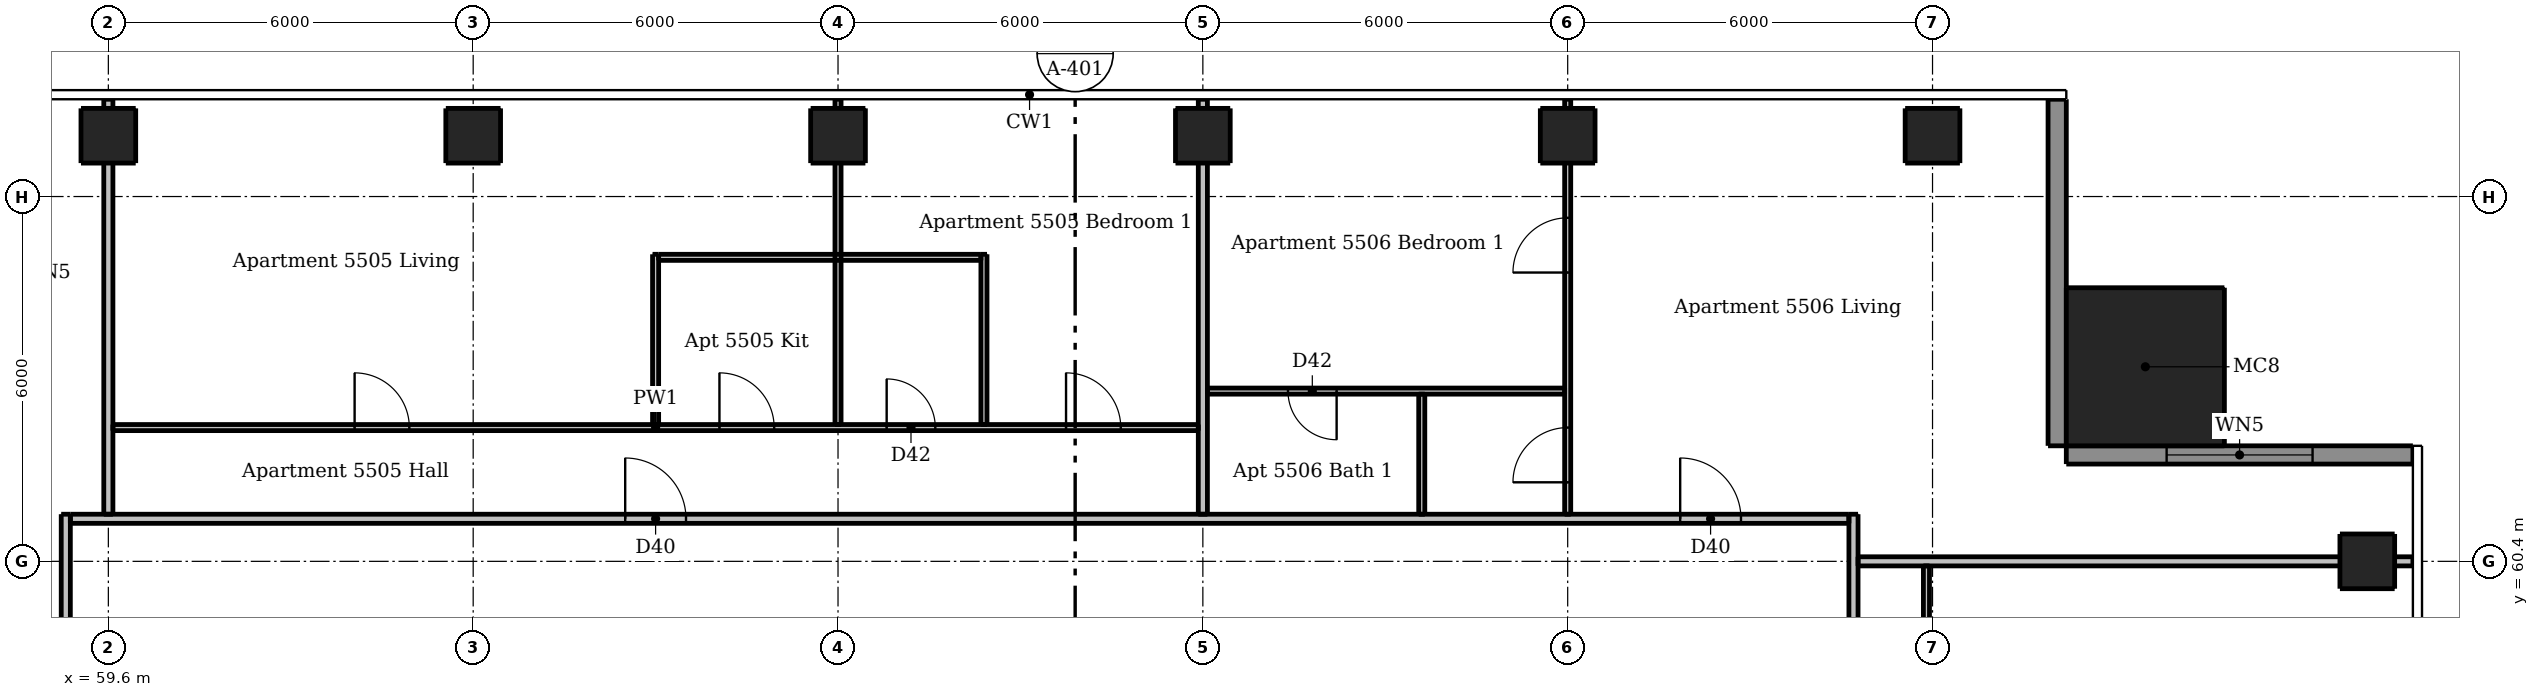
"""IFC4 building model, lengths in metres.
Left out: names, types, materials, properties, quantities, classifications, styles, units other than length and angle.
Written with IfcOpenShell. Run it as: python <this file> out.ifc"""

import sys

from ifc_helpers import new_model, si_unit, direction, frame, frame_2d, origin, origin_2d, place, context, subcontext, project, spatial, rectangle, extrude, element, fill, save


model = new_model("IFC4")
c1 = context("Model", 3, precision=1e-05, world=origin(), true_north=direction((0.0, 1.0)))
c2 = subcontext(c1, "Body", "Model", "MODEL_VIEW")
j1 = project(units=[si_unit("LENGTHUNIT", "METRE"), si_unit("PLANEANGLEUNIT", "RADIAN")], contexts=[c1])
p1 = place(None, origin())
s1 = spatial("IfcSite", under=j1, at=p1, CompositionType="ELEMENT")
p2 = place(p1, origin())
s2 = spatial("IfcBuilding", under=s1, at=p2, CompositionType="ELEMENT")
p3 = place(p2, frame((0.0, 0.0, 206.8)))
s3 = spatial("IfcBuildingStorey", under=s2, at=p3, CompositionType="ELEMENT", Elevation=206.8)
for number, where, z_axis, x_axis in (
    (1, (96.75, 60.4, 0.0), (0.0, 0.0, 1.0), (1.0, 0.0, 0.0)),
    (2, (59.6, 67.4, 0.0), (0.0, 0.0, 1.0), (1.0, 0.0, 0.0)),
    (3, (65.6, 67.4, 0.0), (0.0, 0.0, 1.0), (1.0, 0.0, 0.0)),
    (4, (71.6, 67.4, 0.0), (0.0, 0.0, 1.0), (1.0, 0.0, 0.0)),
    (5, (77.6, 67.4, 0.0), (0.0, 0.0, 1.0), (1.0, 0.0, 0.0)),
    (6, (83.6, 67.4, 0.0), (0.0, 0.0, 1.0), (1.0, 0.0, 0.0)),
    (7, (89.6, 67.4, 0.0), (0.0, 0.0, 1.0), (1.0, 0.0, 0.0)),
):
    element("IfcColumn", number, at=place(p3, frame(where, z_axis=z_axis, x_axis=x_axis)), inside=s3, PredefinedType="COLUMN", context=c2, shape_type="SweptSolid", body=[
        extrude(rectangle(XDim=0.9, YDim=0.9, at=origin_2d()), origin(), (0.0, 0.0, 1.0), 3.05),
    ])
p4 = place(p3, frame((93.1, 63.6, 0.0), z_axis=(0.0, 0.0, 1.0), x_axis=(1.0, 0.0, 0.0)))
e8 = element("IfcColumn", 8, at=p4, inside=s3, PredefinedType="COLUMN", context=c2, shape_type="SweptSolid", body=[
    extrude(rectangle(XDim=2.6, YDim=2.6, at=origin_2d()), origin(), (0.0, 0.0, 1.0), 3.3),
])
p5 = place(p3, frame((97.5, 62.15, 0.0), z_axis=(0.0, 0.0, 1.0), x_axis=(-1.0, 0.0, 0.0)))
e9 = element("IfcWall", 9, at=p5, inside=s3, PredefinedType="SOLIDWALL", context=c2, shape_type="SweptSolid", body=[
    extrude(rectangle(XDim=5.7, YDim=0.3, at=frame_2d((2.85, 0.0))), origin(), (0.0, 0.0, 1.0), 3.05),
])
p6 = place(p5, frame((1.65, 0.0, 0.15)))
e10 = element("IfcOpeningElement", 10, at=p6, cuts=e9, PredefinedType="OPENING", context=c2, shape_type="SweptSolid", body=[
    extrude(rectangle(XDim=2.4, YDim=2.1, at=frame_2d((1.2, 1.05))), frame((0.0, 0.16, 0.0), z_axis=(0.0, -1.0, 0.0), x_axis=(1.0, 0.0, 0.0)), (0.0, 0.0, 1.0), 0.32),
])
p7 = place(p3, frame((91.65, 62.3, 0.0), z_axis=(0.0, 0.0, 1.0), x_axis=(0.0, 1.0, 0.0)))
e11 = element("IfcWall", 11, at=p7, inside=s3, PredefinedType="SOLIDWALL", context=c2, shape_type="SweptSolid", body=[
    extrude(rectangle(XDim=5.7, YDim=0.3, at=frame_2d((2.85, 0.0))), origin(), (0.0, 0.0, 1.0), 3.05),
])
p8 = place(p3, frame((68.6, 62.65, 0.0), z_axis=(0.0, 0.0, 1.0), x_axis=(0.0, 1.0, 0.0)))
e12 = element("IfcWall", 12, at=p8, inside=s3, PredefinedType="PARTITIONING", context=c2, shape_type="SweptSolid", body=[
    extrude(rectangle(XDim=2.8, YDim=0.1, at=frame_2d((1.4, 0.0))), origin(), (0.0, 0.0, 1.0), 3.05),
])
p9 = place(p3, frame((71.6, 62.65, 0.0), z_axis=(0.0, 0.0, 1.0), x_axis=(0.0, 1.0, 0.0)))
e13 = element("IfcWall", 13, at=p9, inside=s3, PredefinedType="PARTITIONING", context=c2, shape_type="SweptSolid", body=[
    extrude(rectangle(XDim=5.35, YDim=0.1, at=frame_2d((2.675, 0.0))), origin(), (0.0, 0.0, 1.0), 2.516),
])
p10 = place(p3, frame((74.0, 62.65, 0.0), z_axis=(0.0, 0.0, 1.0), x_axis=(0.0, 1.0, 0.0)))
e14 = element("IfcWall", 14, at=p10, inside=s3, PredefinedType="PARTITIONING", context=c2, shape_type="SweptSolid", body=[
    extrude(rectangle(XDim=2.8, YDim=0.1, at=frame_2d((1.4, 0.0))), origin(), (0.0, 0.0, 1.0), 3.05),
])
p11 = place(p3, frame((81.2, 61.175, 0.0), z_axis=(0.0, 0.0, 1.0), x_axis=(0.0, 1.0, 0.0)))
e15 = element("IfcWall", 15, at=p11, inside=s3, PredefinedType="PARTITIONING", context=c2, shape_type="SweptSolid", body=[
    extrude(rectangle(XDim=1.975, YDim=0.1, at=frame_2d((0.987, 0.0))), origin(), (0.0, 0.0, 1.0), 3.05),
])
p12 = place(p3, frame((83.6, 61.175, 0.0), z_axis=(0.0, 0.0, 1.0), x_axis=(0.0, 1.0, 0.0)))
e16 = element("IfcWall", 16, at=p12, inside=s3, PredefinedType="PARTITIONING", context=c2, shape_type="SweptSolid", body=[
    extrude(rectangle(XDim=6.825, YDim=0.1, at=frame_2d((3.413, 0.0))), origin(), (0.0, 0.0, 1.0), 2.516),
])
p13 = place(p12, frame((0.525, 0.0, 0.0)))
e17 = element("IfcOpeningElement", 17, at=p13, cuts=e16, PredefinedType="OPENING", context=c2, shape_type="SweptSolid", body=[
    extrude(rectangle(XDim=0.9, YDim=2.1, at=frame_2d((0.45, 1.05))), frame((0.0, 0.06, 0.0), z_axis=(0.0, -1.0, 0.0), x_axis=(1.0, 0.0, 0.0)), (0.0, 0.0, 1.0), 0.12),
])
p14 = place(p12, frame((3.975, 0.0, 0.0)))
e18 = element("IfcOpeningElement", 18, at=p14, cuts=e16, PredefinedType="OPENING", context=c2, shape_type="SweptSolid", body=[
    extrude(rectangle(XDim=0.9, YDim=2.1, at=frame_2d((0.45, 1.05))), frame((0.0, 0.06, 0.0), z_axis=(0.0, -1.0, 0.0), x_axis=(1.0, 0.0, 0.0)), (0.0, 0.0, 1.0), 0.12),
])
p15 = place(p3, frame((89.5, 60.325, 0.0), z_axis=(0.0, 0.0, 1.0), x_axis=(0.0, -1.0, 0.0)))
e19 = element("IfcWall", 19, at=p15, inside=s3, PredefinedType="PARTITIONING", context=c2, shape_type="SweptSolid", body=[
    extrude(rectangle(XDim=20.85, YDim=0.1, at=frame_2d((10.425, 0.0))), origin(), (0.0, 0.0, 1.0), 2.51),
])
p16 = place(p15, frame((12.975, 0.0, 0.0)))
e20 = element("IfcOpeningElement", 20, at=p16, cuts=e19, PredefinedType="OPENING", context=c2, shape_type="SweptSolid", body=[
    extrude(rectangle(XDim=0.9, YDim=2.1, at=frame_2d((0.45, 1.05))), frame((0.0, 0.06, 0.0), z_axis=(0.0, -1.0, 0.0), x_axis=(1.0, 0.0, 0.0)), (0.0, 0.0, 1.0), 0.12),
])
p17 = place(p15, frame((6.975, 0.0, 0.0)))
e21 = element("IfcOpeningElement", 21, at=p17, cuts=e19, PredefinedType="OPENING", context=c2, shape_type="SweptSolid", body=[
    extrude(rectangle(XDim=0.9, YDim=2.1, at=frame_2d((0.45, 1.05))), frame((0.0, 0.06, 0.0), z_axis=(0.0, -1.0, 0.0), x_axis=(1.0, 0.0, 0.0)), (0.0, 0.0, 1.0), 0.12),
])
p18 = place(p15, frame((18.975, 0.0, 0.0)))
e22 = element("IfcOpeningElement", 22, at=p18, cuts=e19, PredefinedType="OPENING", context=c2, shape_type="SweptSolid", body=[
    extrude(rectangle(XDim=0.9, YDim=2.1, at=frame_2d((0.45, 1.05))), frame((0.0, 0.06, 0.0), z_axis=(0.0, -1.0, 0.0), x_axis=(1.0, 0.0, 0.0)), (0.0, 0.0, 1.0), 0.12),
])
p19 = place(p15, frame((1.275, 0.0, 0.0)))
e23 = element("IfcOpeningElement", 23, at=p19, cuts=e19, PredefinedType="OPENING", context=c2, shape_type="SweptSolid", body=[
    extrude(rectangle(XDim=0.9, YDim=2.1, at=frame_2d((0.45, 1.05))), frame((0.0, 0.06, 0.0), z_axis=(0.0, -1.0, 0.0), x_axis=(1.0, 0.0, 0.0)), (0.0, 0.0, 1.0), 0.12),
])
p20 = place(p15, frame((4.325, 0.0, 0.0)))
e24 = element("IfcOpeningElement", 24, at=p20, cuts=e19, PredefinedType="OPENING", context=c2, shape_type="SweptSolid", body=[
    extrude(rectangle(XDim=0.8, YDim=2.1, at=frame_2d((0.4, 1.05))), frame((0.0, 0.06, 0.0), z_axis=(0.0, -1.0, 0.0), x_axis=(1.0, 0.0, 0.0)), (0.0, 0.0, 1.0), 0.12),
])
p21 = place(p3, frame((68.65, 65.4, 0.0), z_axis=(0.0, 0.0, 1.0), x_axis=(1.0, 0.0, 0.0)))
e25 = element("IfcWall", 25, at=p21, inside=s3, PredefinedType="PARTITIONING", context=c2, shape_type="SweptSolid", body=[
    extrude(rectangle(XDim=5.3, YDim=0.1, at=frame_2d((2.65, 0.0))), origin(), (0.0, 0.0, 1.0), 3.05),
])
p22 = place(p3, frame((83.55, 63.2, 0.0), z_axis=(0.0, 0.0, 1.0), x_axis=(-1.0, 0.0, 0.0)))
e26 = element("IfcWall", 26, at=p22, inside=s3, PredefinedType="PARTITIONING", context=c2, shape_type="SweptSolid", body=[
    extrude(rectangle(XDim=5.875, YDim=0.1, at=frame_2d((2.938, 0.0))), origin(), (0.0, 0.0, 1.0), 3.05),
])
p23 = place(p22, frame((3.75, 0.0, 0.0)))
e27 = element("IfcOpeningElement", 27, at=p23, cuts=e26, PredefinedType="OPENING", context=c2, shape_type="SweptSolid", body=[
    extrude(rectangle(XDim=0.8, YDim=2.1, at=frame_2d((0.4, 1.05))), frame((0.0, 0.06, 0.0), z_axis=(0.0, -1.0, 0.0), x_axis=(1.0, 0.0, 0.0)), (0.0, 0.0, 1.0), 0.12),
])
p24 = place(p3, frame((59.675, 62.6, 0.0), z_axis=(0.0, 0.0, 1.0), x_axis=(1.0, 0.0, 0.0)))
e28 = element("IfcWall", 28, at=p24, inside=s3, PredefinedType="PARTITIONING", context=c2, shape_type="SweptSolid", body=[
    extrude(rectangle(XDim=17.85, YDim=0.1, at=frame_2d((8.925, 0.0))), origin(), (0.0, 0.0, 1.0), 3.05),
])
p25 = place(p24, frame((3.975, 0.0, 0.0)))
e29 = element("IfcOpeningElement", 29, at=p25, cuts=e28, PredefinedType="OPENING", context=c2, shape_type="SweptSolid", body=[
    extrude(rectangle(XDim=0.9, YDim=2.1, at=frame_2d((0.45, 1.05))), frame((0.0, 0.06, 0.0), z_axis=(0.0, -1.0, 0.0), x_axis=(1.0, 0.0, 0.0)), (0.0, 0.0, 1.0), 0.12),
])
p26 = place(p24, frame((9.975, 0.0, 0.0)))
e30 = element("IfcOpeningElement", 30, at=p26, cuts=e28, PredefinedType="OPENING", context=c2, shape_type="SweptSolid", body=[
    extrude(rectangle(XDim=0.9, YDim=2.1, at=frame_2d((0.45, 1.05))), frame((0.0, 0.06, 0.0), z_axis=(0.0, -1.0, 0.0), x_axis=(1.0, 0.0, 0.0)), (0.0, 0.0, 1.0), 0.12),
])
p27 = place(p24, frame((15.675, 0.0, 0.0)))
e31 = element("IfcOpeningElement", 31, at=p27, cuts=e28, PredefinedType="OPENING", context=c2, shape_type="SweptSolid", body=[
    extrude(rectangle(XDim=0.9, YDim=2.1, at=frame_2d((0.45, 1.05))), frame((0.0, 0.06, 0.0), z_axis=(0.0, -1.0, 0.0), x_axis=(1.0, 0.0, 0.0)), (0.0, 0.0, 1.0), 0.12),
])
p28 = place(p24, frame((12.725, 0.0, 0.0)))
e32 = element("IfcOpeningElement", 32, at=p28, cuts=e28, PredefinedType="OPENING", context=c2, shape_type="SweptSolid", body=[
    extrude(rectangle(XDim=0.8, YDim=2.1, at=frame_2d((0.4, 1.05))), frame((0.0, 0.06, 0.0), z_axis=(0.0, -1.0, 0.0), x_axis=(1.0, 0.0, 0.0)), (0.0, 0.0, 1.0), 0.12),
])
p29 = place(p3, frame((58.9, 30.325, 0.0), z_axis=(0.0, 0.0, 1.0), x_axis=(0.0, 1.0, 0.0)))
e33 = element("IfcWall", 33, at=p29, inside=s3, PredefinedType="PARTITIONING", context=c2, shape_type="SweptSolid", body=[
    extrude(rectangle(XDim=30.85, YDim=0.15, at=frame_2d((15.425, 0.0))), origin(), (0.0, 0.0, 1.0), 3.05),
])
p30 = place(p29, frame((9.225, 0.0, 0.0)))
e34 = element("IfcOpeningElement", 34, at=p30, cuts=e33, PredefinedType="OPENING", context=c2, shape_type="SweptSolid", body=[
    extrude(rectangle(XDim=1.0, YDim=2.1, at=frame_2d((0.5, 1.05))), frame((0.0, 0.085, 0.0), z_axis=(0.0, -1.0, 0.0), x_axis=(1.0, 0.0, 0.0)), (0.0, 0.0, 1.0), 0.17),
])
p31 = place(p29, frame((26.925, 0.0, 0.0)))
e35 = element("IfcOpeningElement", 35, at=p31, cuts=e33, PredefinedType="OPENING", context=c2, shape_type="SweptSolid", body=[
    extrude(rectangle(XDim=1.0, YDim=2.1, at=frame_2d((0.5, 1.05))), frame((0.0, 0.085, 0.0), z_axis=(0.0, -1.0, 0.0), x_axis=(1.0, 0.0, 0.0)), (0.0, 0.0, 1.0), 0.17),
])
p32 = place(p3, frame((59.6, 61.175, 0.0), z_axis=(0.0, 0.0, 1.0), x_axis=(0.0, 1.0, 0.0)))
e36 = element("IfcWall", 36, at=p32, inside=s3, PredefinedType="PARTITIONING", context=c2, shape_type="SweptSolid", body=[
    extrude(rectangle(XDim=6.825, YDim=0.15, at=frame_2d((3.413, 0.0))), origin(), (0.0, 0.0, 1.0), 2.51),
])
p33 = place(p3, frame((77.6, 61.175, 0.0), z_axis=(0.0, 0.0, 1.0), x_axis=(0.0, 1.0, 0.0)))
e37 = element("IfcWall", 37, at=p33, inside=s3, PredefinedType="PARTITIONING", context=c2, shape_type="SweptSolid", body=[
    extrude(rectangle(XDim=6.825, YDim=0.15, at=frame_2d((3.413, 0.0))), origin(), (0.0, 0.0, 1.0), 2.516),
])
p34 = place(p3, frame((88.3, 61.175, 0.0), z_axis=(0.0, 0.0, 1.0), x_axis=(0.0, -1.0, 0.0)))
e38 = element("IfcWall", 38, at=p34, inside=s3, PredefinedType="PARTITIONING", context=c2, shape_type="SweptSolid", body=[
    extrude(rectangle(XDim=29.4, YDim=0.15, at=frame_2d((14.7, 0.0))), origin(), (0.0, 0.0, 1.0), 3.05),
])
p35 = place(p34, frame((28.125, 0.0, 0.0)))
e39 = element("IfcOpeningElement", 39, at=p35, cuts=e38, PredefinedType="OPENING", context=c2, shape_type="SweptSolid", body=[
    extrude(rectangle(XDim=1.0, YDim=2.1, at=frame_2d((0.5, 1.05))), frame((0.0, 0.085, 0.0), z_axis=(0.0, -1.0, 0.0), x_axis=(1.0, 0.0, 0.0)), (0.0, 0.0, 1.0), 0.17),
])
p36 = place(p34, frame((10.775, 0.0, 0.0)))
e40 = element("IfcOpeningElement", 40, at=p36, cuts=e38, PredefinedType="OPENING", context=c2, shape_type="SweptSolid", body=[
    extrude(rectangle(XDim=1.0, YDim=2.1, at=frame_2d((0.5, 1.05))), frame((0.0, 0.085, 0.0), z_axis=(0.0, -1.0, 0.0), x_axis=(1.0, 0.0, 0.0)), (0.0, 0.0, 1.0), 0.17),
])
p37 = place(p3, frame((58.975, 61.1, 0.0), z_axis=(0.0, 0.0, 1.0), x_axis=(1.0, 0.0, 0.0)))
e41 = element("IfcWall", 41, at=p37, inside=s3, PredefinedType="PARTITIONING", context=c2, shape_type="SweptSolid", body=[
    extrude(rectangle(XDim=29.25, YDim=0.15, at=frame_2d((14.625, 0.0))), origin(), (0.0, 0.0, 1.0), 3.05),
])
p38 = place(p37, frame((9.125, 0.0, 0.0)))
e42 = element("IfcOpeningElement", 42, at=p38, cuts=e41, PredefinedType="OPENING", context=c2, shape_type="SweptSolid", body=[
    extrude(rectangle(XDim=1.0, YDim=2.1, at=frame_2d((0.5, 1.05))), frame((0.0, 0.085, 0.0), z_axis=(0.0, -1.0, 0.0), x_axis=(1.0, 0.0, 0.0)), (0.0, 0.0, 1.0), 0.17),
])
p39 = place(p37, frame((26.475, 0.0, 0.0)))
e43 = element("IfcOpeningElement", 43, at=p39, cuts=e41, PredefinedType="OPENING", context=c2, shape_type="SweptSolid", body=[
    extrude(rectangle(XDim=1.0, YDim=2.1, at=frame_2d((0.5, 1.05))), frame((0.0, 0.085, 0.0), z_axis=(0.0, -1.0, 0.0), x_axis=(1.0, 0.0, 0.0)), (0.0, 0.0, 1.0), 0.17),
])
p40 = place(p3, frame((88.375, 60.4, 0.0), z_axis=(0.0, 0.0, 1.0), x_axis=(1.0, 0.0, 0.0)))
e44 = element("IfcWall", 44, at=p40, inside=s3, PredefinedType="PARTITIONING", context=c2, shape_type="SweptSolid", body=[
    extrude(rectangle(XDim=9.125, YDim=0.15, at=frame_2d((4.562, 0.0))), origin(), (0.0, 0.0, 1.0), 2.59),
])
p41 = place(p6, origin())
e45 = element("IfcWindow", 45, at=p41, inside=s3, PartitioningType="DOUBLE_PANEL_VERTICAL", PredefinedType="WINDOW", context=c2, shape_type="SweptSolid", body=[
    extrude(rectangle(XDim=2.4, YDim=2.1, at=frame_2d((1.2, 1.05))), frame((0.0, 0.03, 0.0), z_axis=(0.0, -1.0, 0.0), x_axis=(1.0, 0.0, 0.0)), (0.0, 0.0, 1.0), 0.06),
])
fill(e10, e45)
p42 = place(p38, origin())
e46 = element("IfcDoor", 46, at=p42, inside=s3, OperationType="SINGLE_SWING_LEFT", PredefinedType="DOOR", context=c2, shape_type="SweptSolid", body=[
    extrude(rectangle(XDim=1.0, YDim=2.1, at=frame_2d((0.5, 1.05))), frame((0.0, 0.025, 0.0), z_axis=(0.0, -1.0, 0.0), x_axis=(1.0, 0.0, 0.0)), (0.0, 0.0, 1.0), 0.05),
])
fill(e42, e46)
p43 = place(p25, origin())
e47 = element("IfcDoor", 47, at=p43, inside=s3, OperationType="SINGLE_SWING_LEFT", PredefinedType="DOOR", context=c2, shape_type="SweptSolid", body=[
    extrude(rectangle(XDim=0.9, YDim=2.1, at=frame_2d((0.45, 1.05))), frame((0.0, 0.025, 0.0), z_axis=(0.0, -1.0, 0.0), x_axis=(1.0, 0.0, 0.0)), (0.0, 0.0, 1.0), 0.05),
])
fill(e29, e47)
p44 = place(p26, origin())
e48 = element("IfcDoor", 48, at=p44, inside=s3, OperationType="SINGLE_SWING_LEFT", PredefinedType="DOOR", context=c2, shape_type="SweptSolid", body=[
    extrude(rectangle(XDim=0.9, YDim=2.1, at=frame_2d((0.45, 1.05))), frame((0.0, 0.025, 0.0), z_axis=(0.0, -1.0, 0.0), x_axis=(1.0, 0.0, 0.0)), (0.0, 0.0, 1.0), 0.05),
])
fill(e30, e48)
p45 = place(p27, origin())
e49 = element("IfcDoor", 49, at=p45, inside=s3, OperationType="SINGLE_SWING_LEFT", PredefinedType="DOOR", context=c2, shape_type="SweptSolid", body=[
    extrude(rectangle(XDim=0.9, YDim=2.1, at=frame_2d((0.45, 1.05))), frame((0.0, 0.025, 0.0), z_axis=(0.0, -1.0, 0.0), x_axis=(1.0, 0.0, 0.0)), (0.0, 0.0, 1.0), 0.05),
])
fill(e31, e49)
p46 = place(p28, origin())
e50 = element("IfcDoor", 50, at=p46, inside=s3, OperationType="SINGLE_SWING_LEFT", PredefinedType="DOOR", context=c2, shape_type="SweptSolid", body=[
    extrude(rectangle(XDim=0.8, YDim=2.1, at=frame_2d((0.4, 1.05))), frame((0.0, 0.025, 0.0), z_axis=(0.0, -1.0, 0.0), x_axis=(1.0, 0.0, 0.0)), (0.0, 0.0, 1.0), 0.05),
])
fill(e32, e50)
p47 = place(p39, origin())
e51 = element("IfcDoor", 51, at=p47, inside=s3, OperationType="SINGLE_SWING_LEFT", PredefinedType="DOOR", context=c2, shape_type="SweptSolid", body=[
    extrude(rectangle(XDim=1.0, YDim=2.1, at=frame_2d((0.5, 1.05))), frame((0.0, 0.025, 0.0), z_axis=(0.0, -1.0, 0.0), x_axis=(1.0, 0.0, 0.0)), (0.0, 0.0, 1.0), 0.05),
])
fill(e43, e51)
p48 = place(p13, origin())
e52 = element("IfcDoor", 52, at=p48, inside=s3, OperationType="SINGLE_SWING_LEFT", PredefinedType="DOOR", context=c2, shape_type="SweptSolid", body=[
    extrude(rectangle(XDim=0.9, YDim=2.1, at=frame_2d((0.45, 1.05))), frame((0.0, 0.025, 0.0), z_axis=(0.0, -1.0, 0.0), x_axis=(1.0, 0.0, 0.0)), (0.0, 0.0, 1.0), 0.05),
])
fill(e17, e52)
p49 = place(p14, origin())
e53 = element("IfcDoor", 53, at=p49, inside=s3, OperationType="SINGLE_SWING_LEFT", PredefinedType="DOOR", context=c2, shape_type="SweptSolid", body=[
    extrude(rectangle(XDim=0.9, YDim=2.1, at=frame_2d((0.45, 1.05))), frame((0.0, 0.025, 0.0), z_axis=(0.0, -1.0, 0.0), x_axis=(1.0, 0.0, 0.0)), (0.0, 0.0, 1.0), 0.05),
])
fill(e18, e53)
p50 = place(p23, origin())
e54 = element("IfcDoor", 54, at=p50, inside=s3, OperationType="SINGLE_SWING_LEFT", PredefinedType="DOOR", context=c2, shape_type="SweptSolid", body=[
    extrude(rectangle(XDim=0.8, YDim=2.1, at=frame_2d((0.4, 1.05))), frame((0.0, 0.025, 0.0), z_axis=(0.0, -1.0, 0.0), x_axis=(1.0, 0.0, 0.0)), (0.0, 0.0, 1.0), 0.05),
])
fill(e27, e54)
save(model, sys.argv[1])
